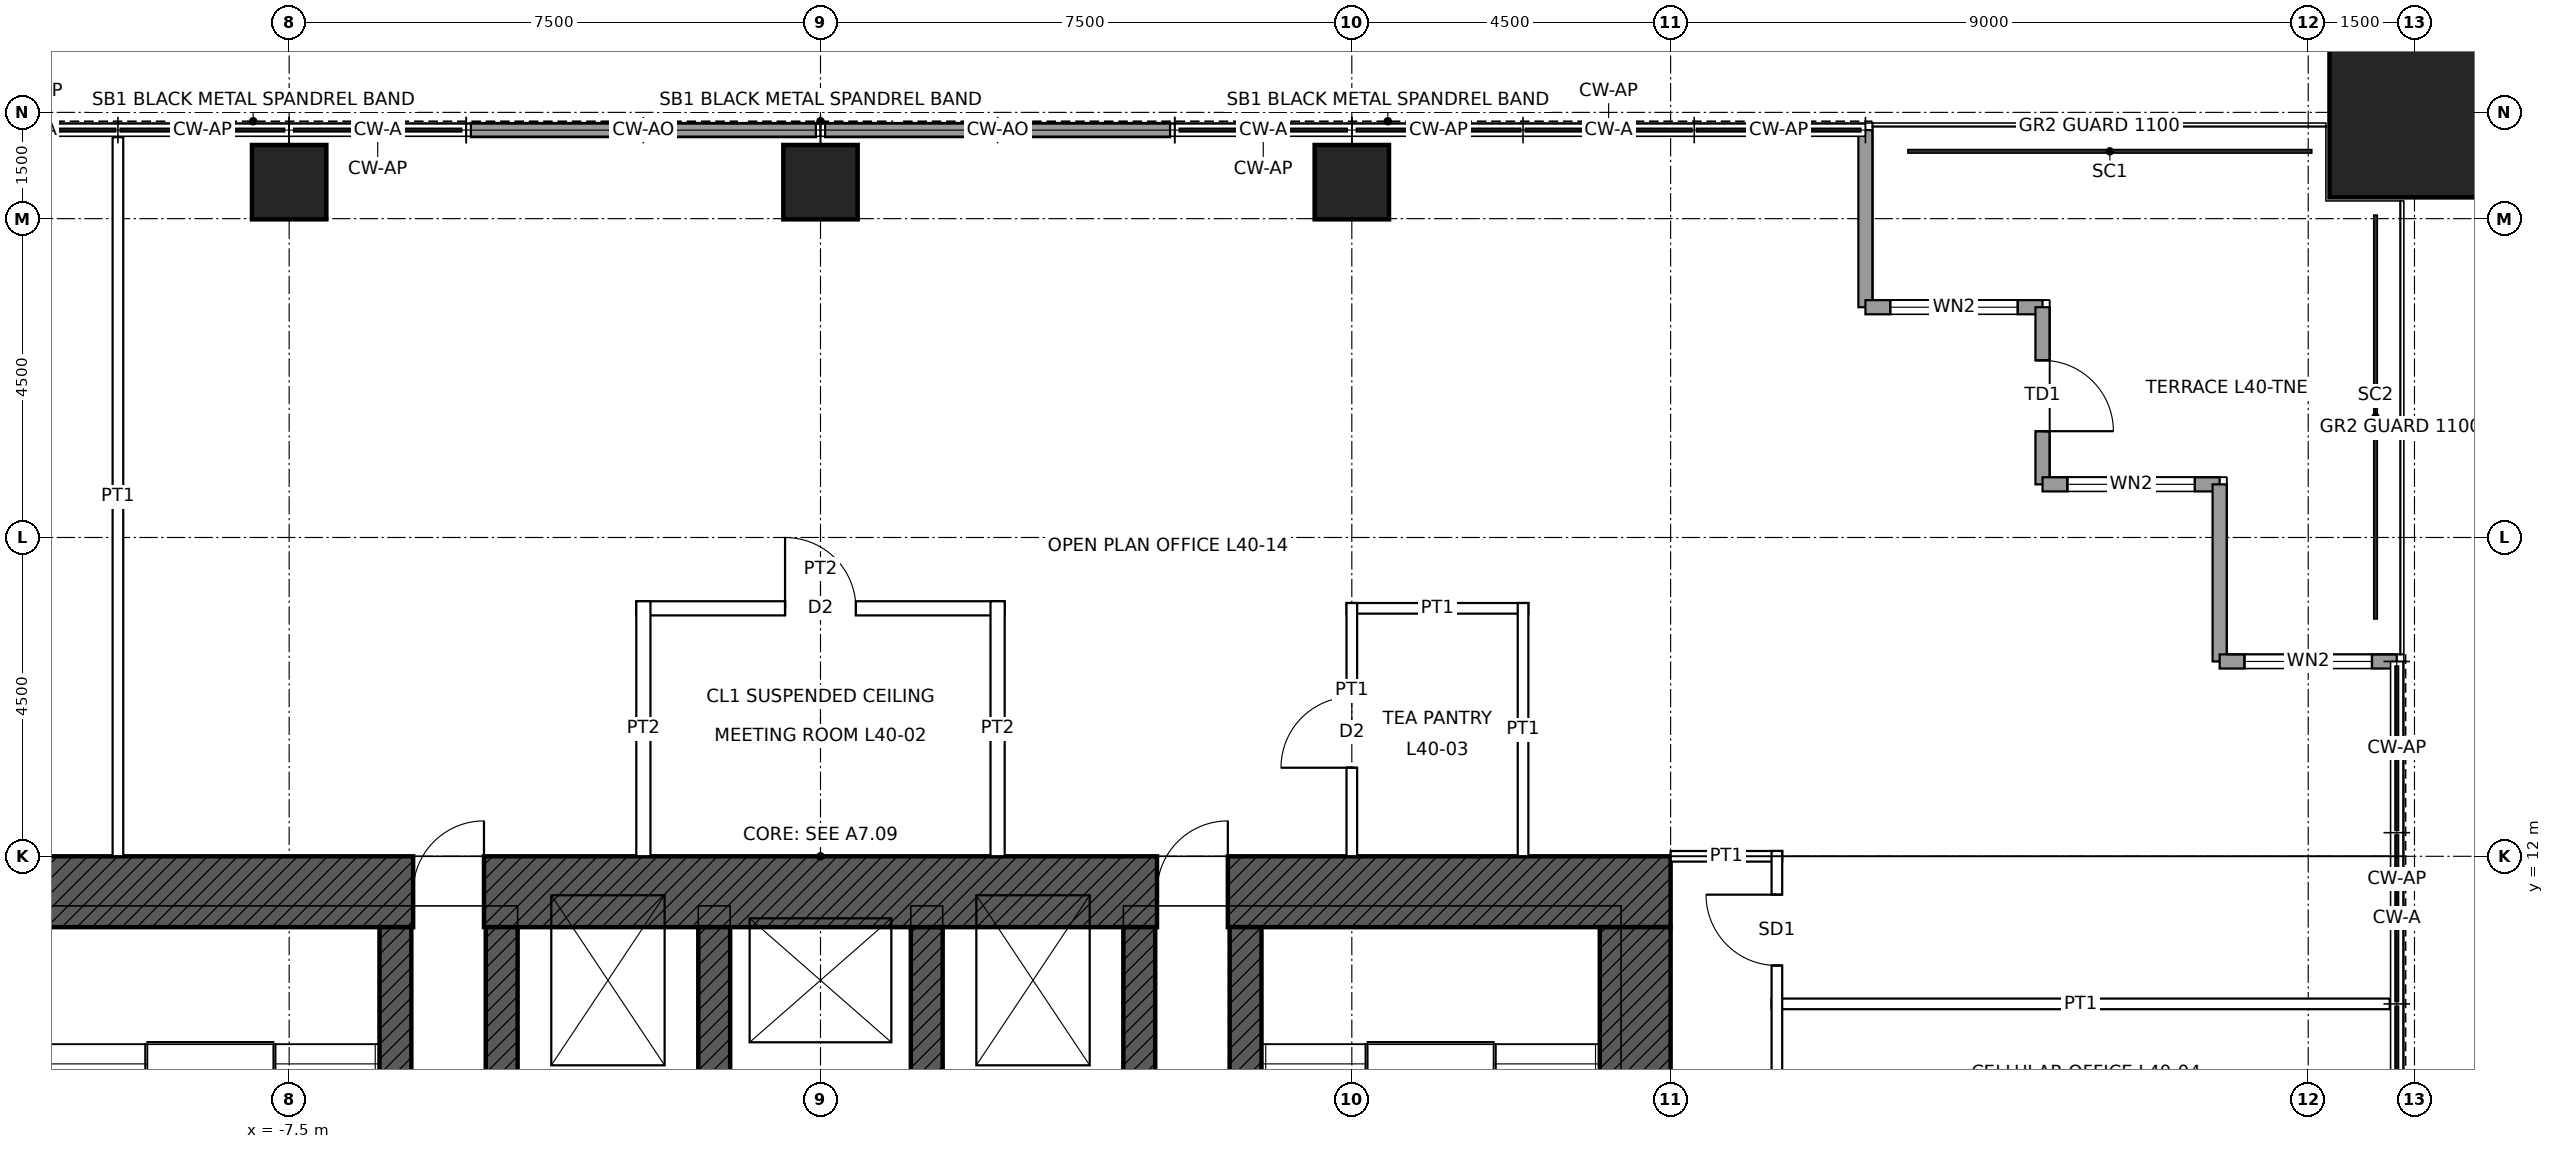
"""IFC4 building model, lengths in metres.
Left out: names, types, materials, properties, quantities, classifications, styles, units other than length and angle.
Written with IfcOpenShell. Run it as: python <this file> out.ifc"""

import sys

from ifc_helpers import new_model, si_unit, direction, frame, frame_2d, origin, origin_2d, place, context, subcontext, project, spatial, rectangle, hollow_rectangle, extrude, element, fill, save


model = new_model("IFC4")
c1 = context("Model", 3, precision=1e-05, world=origin(), true_north=direction((0.0, 1.0)))
c2 = subcontext(c1, "Body", "Model", "MODEL_VIEW")
j1 = project(units=[si_unit("LENGTHUNIT", "METRE"), si_unit("PLANEANGLEUNIT", "RADIAN")], contexts=[c1])
p1 = place(None, origin())
s1 = spatial("IfcSite", under=j1, at=p1, CompositionType="ELEMENT")
p2 = place(p1, origin())
s2 = spatial("IfcBuilding", under=s1, at=p2, CompositionType="ELEMENT")
p3 = place(p2, frame((0.0, 0.0, 193.9)))
s3 = spatial("IfcBuildingStorey", under=s2, at=p3, CompositionType="ELEMENT", Elevation=193.9)
p4 = place(p3, frame((22.5, 22.5, 0.0), z_axis=(0.0, 0.0, 1.0), x_axis=(1.0, 0.0, 0.0)))
e1 = element("IfcColumn", 1, at=p4, inside=s3, PredefinedType="COLUMN", context=c2, shape_type="SweptSolid", body=[
    extrude(hollow_rectangle(XDim=2.4, YDim=2.4, WallThickness=0.12, at=origin_2d()), origin(), (0.0, 0.0, 1.0), 4.0),
])
for number, where, z_axis, x_axis in (
    (2, (-7.5, 21.515, 0.0), (0.0, 0.0, 1.0), (1.0, 0.0, 0.0)),
    (3, (0.0, 21.515, 0.0), (0.0, 0.0, 1.0), (1.0, 0.0, 0.0)),
    (4, (7.5, 21.515, 0.0), (0.0, 0.0, 1.0), (1.0, 0.0, 0.0)),
):
    element("IfcColumn", number, at=place(p3, frame(where, z_axis=z_axis, x_axis=x_axis)), inside=s3, PredefinedType="COLUMN", context=c2, shape_type="SweptSolid", body=[
        extrude(hollow_rectangle(XDim=1.05, YDim=1.05, WallThickness=0.07, at=origin_2d()), origin(), (0.0, 0.0, 1.0), 4.0),
    ])
p5 = place(p3, frame((-12.0, 11.5, 0.0), z_axis=(0.0, 0.0, 1.0), x_axis=(1.0, 0.0, 0.0)))
e5 = element("IfcWall", 5, at=p5, inside=s3, PredefinedType="SHEAR", context=c2, shape_type="SweptSolid", body=[
    extrude(rectangle(XDim=24.0, YDim=1.0, at=frame_2d((12.0, 0.0))), origin(), (0.0, 0.0, 1.0), 4.0),
])
p6 = place(p5, frame((6.25, 0.0, 0.0)))
e6 = element("IfcOpeningElement", 6, at=p6, cuts=e5, PredefinedType="OPENING", context=c2, shape_type="SweptSolid", body=[
    extrude(rectangle(XDim=1.0, YDim=2.4, at=frame_2d((0.5, 1.2))), frame((0.0, 0.51, 0.0), z_axis=(0.0, -1.0, 0.0), x_axis=(1.0, 0.0, 0.0)), (0.0, 0.0, 1.0), 1.02),
])
p7 = place(p5, frame((16.75, 0.0, 0.0)))
e7 = element("IfcOpeningElement", 7, at=p7, cuts=e5, PredefinedType="OPENING", context=c2, shape_type="SweptSolid", body=[
    extrude(rectangle(XDim=1.0, YDim=2.4, at=frame_2d((0.5, 1.2))), frame((0.0, 0.51, 0.0), z_axis=(0.0, -1.0, 0.0), x_axis=(1.0, 0.0, 0.0)), (0.0, 0.0, 1.0), 1.02),
])
p8 = place(p3, frame((11.5, 11.0, 0.0), z_axis=(0.0, 0.0, 1.0), x_axis=(0.0, -1.0, 0.0)))
e8 = element("IfcWall", 8, at=p8, inside=s3, PredefinedType="SHEAR", context=c2, shape_type="SweptSolid", body=[
    extrude(rectangle(XDim=22.0, YDim=1.0, at=frame_2d((11.0, 0.0))), origin(), (0.0, 0.0, 1.0), 4.0),
])
p9 = place(p8, frame((10.5, 0.0, 0.0)))
e9 = element("IfcOpeningElement", 9, at=p9, cuts=e8, PredefinedType="OPENING", context=c2, shape_type="SweptSolid", body=[
    extrude(rectangle(XDim=1.0, YDim=2.4, at=frame_2d((0.5, 1.2))), frame((0.0, 0.51, 0.0), z_axis=(0.0, -1.0, 0.0), x_axis=(1.0, 0.0, 0.0)), (0.0, 0.0, 1.0), 1.02),
])
p10 = place(p3, frame((-6.0, 4.5, 0.0), z_axis=(0.0, 0.0, 1.0), x_axis=(0.0, 1.0, 0.0)))
e10 = element("IfcWall", 10, at=p10, inside=s3, PredefinedType="SHEAR", context=c2, shape_type="SweptSolid", body=[
    extrude(rectangle(XDim=6.5, YDim=0.45, at=frame_2d((3.25, 0.0))), origin(), (0.0, 0.0, 1.0), 4.0),
])
p11 = place(p10, frame((0.6, 0.0, 0.0)))
e11 = element("IfcOpeningElement", 11, at=p11, cuts=e10, PredefinedType="OPENING", context=c2, shape_type="SweptSolid", body=[
    extrude(rectangle(XDim=1.0, YDim=2.1, at=frame_2d((0.5, 1.05))), frame((0.0, 0.235, 0.0), z_axis=(0.0, -1.0, 0.0), x_axis=(1.0, 0.0, 0.0)), (0.0, 0.0, 1.0), 0.47),
])
p12 = place(p3, frame((6.0, 4.5, 0.0), z_axis=(0.0, 0.0, 1.0), x_axis=(0.0, 1.0, 0.0)))
e12 = element("IfcWall", 12, at=p12, inside=s3, PredefinedType="SHEAR", context=c2, shape_type="SweptSolid", body=[
    extrude(rectangle(XDim=6.5, YDim=0.45, at=frame_2d((3.25, 0.0))), origin(), (0.0, 0.0, 1.0), 4.0),
])
p13 = place(p12, frame((0.6, 0.0, 0.0)))
e13 = element("IfcOpeningElement", 13, at=p13, cuts=e12, PredefinedType="OPENING", context=c2, shape_type="SweptSolid", body=[
    extrude(rectangle(XDim=1.0, YDim=2.1, at=frame_2d((0.5, 1.05))), frame((0.0, 0.235, 0.0), z_axis=(0.0, -1.0, 0.0), x_axis=(1.0, 0.0, 0.0)), (0.0, 0.0, 1.0), 0.47),
])
for number, where, z_axis, x_axis in (
    (14, (-4.5, 8.5, 0.0), (0.0, 0.0, 1.0), (0.0, 1.0, 0.0)),
    (15, (4.5, 8.5, 0.0), (0.0, 0.0, 1.0), (0.0, 1.0, 0.0)),
    (16, (-1.5, 8.5, 0.0), (0.0, 0.0, 1.0), (0.0, 1.0, 0.0)),
    (17, (1.5, 8.5, 0.0), (0.0, 0.0, 1.0), (0.0, 1.0, 0.0)),
):
    element("IfcWall", number, at=place(p3, frame(where, z_axis=z_axis, x_axis=x_axis)), inside=s3, PredefinedType="SHEAR", context=c2, shape_type="SweptSolid", body=[
        extrude(rectangle(XDim=2.5, YDim=0.45, at=frame_2d((1.25, 0.0))), origin(), (0.0, 0.0, 1.0), 4.0),
    ])
p14 = place(p3, frame((14.75, 22.25, 0.0), z_axis=(0.0, 0.0, 1.0), x_axis=(0.0, -1.0, 0.0)))
e18 = element("IfcWall", 18, at=p14, inside=s3, PredefinedType="SOLIDWALL", context=c2, shape_type="SweptSolid", body=[
    extrude(rectangle(XDim=2.5, YDim=0.2, at=frame_2d((1.25, 0.0))), origin(), (0.0, 0.0, 1.0), 3.85),
])
p15 = place(p3, frame((14.75, 19.75, 0.0), z_axis=(0.0, 0.0, 1.0), x_axis=(1.0, 0.0, 0.0)))
e19 = element("IfcWall", 19, at=p15, inside=s3, PredefinedType="SOLIDWALL", context=c2, shape_type="SweptSolid", body=[
    extrude(rectangle(XDim=2.5, YDim=0.2, at=frame_2d((1.25, 0.0))), origin(), (0.0, 0.0, 1.0), 3.85),
])
p16 = place(p15, frame((0.35, 0.0, 0.3)))
e20 = element("IfcOpeningElement", 20, at=p16, cuts=e19, PredefinedType="OPENING", context=c2, shape_type="SweptSolid", body=[
    extrude(rectangle(XDim=1.8, YDim=2.4, at=frame_2d((0.9, 1.2))), frame((0.0, 0.11, 0.0), z_axis=(0.0, -1.0, 0.0), x_axis=(1.0, 0.0, 0.0)), (0.0, 0.0, 1.0), 0.22),
])
p17 = place(p3, frame((17.25, 19.75, 0.0), z_axis=(0.0, 0.0, 1.0), x_axis=(0.0, -1.0, 0.0)))
e21 = element("IfcWall", 21, at=p17, inside=s3, PredefinedType="SOLIDWALL", context=c2, shape_type="SweptSolid", body=[
    extrude(rectangle(XDim=2.5, YDim=0.2, at=frame_2d((1.25, 0.0))), origin(), (0.0, 0.0, 1.0), 3.85),
])
p18 = place(p17, frame((0.75, 0.0, 0.0)))
e22 = element("IfcOpeningElement", 22, at=p18, cuts=e21, PredefinedType="OPENING", context=c2, shape_type="SweptSolid", body=[
    extrude(rectangle(XDim=1.0, YDim=2.4, at=frame_2d((0.5, 1.2))), frame((0.0, 0.11, 0.0), z_axis=(0.0, -1.0, 0.0), x_axis=(1.0, 0.0, 0.0)), (0.0, 0.0, 1.0), 0.22),
])
p19 = place(p3, frame((17.25, 17.25, 0.0), z_axis=(0.0, 0.0, 1.0), x_axis=(1.0, 0.0, 0.0)))
e23 = element("IfcWall", 23, at=p19, inside=s3, PredefinedType="SOLIDWALL", context=c2, shape_type="SweptSolid", body=[
    extrude(rectangle(XDim=2.5, YDim=0.2, at=frame_2d((1.25, 0.0))), origin(), (0.0, 0.0, 1.0), 3.85),
])
p20 = place(p19, frame((0.35, 0.0, 0.3)))
e24 = element("IfcOpeningElement", 24, at=p20, cuts=e23, PredefinedType="OPENING", context=c2, shape_type="SweptSolid", body=[
    extrude(rectangle(XDim=1.8, YDim=2.4, at=frame_2d((0.9, 1.2))), frame((0.0, 0.11, 0.0), z_axis=(0.0, -1.0, 0.0), x_axis=(1.0, 0.0, 0.0)), (0.0, 0.0, 1.0), 0.22),
])
p21 = place(p3, frame((19.75, 17.25, 0.0), z_axis=(0.0, 0.0, 1.0), x_axis=(0.0, -1.0, 0.0)))
e25 = element("IfcWall", 25, at=p21, inside=s3, PredefinedType="SOLIDWALL", context=c2, shape_type="SweptSolid", body=[
    extrude(rectangle(XDim=2.5, YDim=0.2, at=frame_2d((1.25, 0.0))), origin(), (0.0, 0.0, 1.0), 3.85),
])
p22 = place(p3, frame((19.75, 14.75, 0.0), z_axis=(0.0, 0.0, 1.0), x_axis=(1.0, 0.0, 0.0)))
e26 = element("IfcWall", 26, at=p22, inside=s3, PredefinedType="SOLIDWALL", context=c2, shape_type="SweptSolid", body=[
    extrude(rectangle(XDim=2.5, YDim=0.2, at=frame_2d((1.25, 0.0))), origin(), (0.0, 0.0, 1.0), 3.85),
])
p23 = place(p22, frame((0.35, 0.0, 0.3)))
e27 = element("IfcOpeningElement", 27, at=p23, cuts=e26, PredefinedType="OPENING", context=c2, shape_type="SweptSolid", body=[
    extrude(rectangle(XDim=1.8, YDim=2.4, at=frame_2d((0.9, 1.2))), frame((0.0, 0.11, 0.0), z_axis=(0.0, -1.0, 0.0), x_axis=(1.0, 0.0, 0.0)), (0.0, 0.0, 1.0), 0.22),
])
for number, where, z_axis, x_axis in (
    (28, (-4.935, 22.25, 0.0), (0.0, 0.0, 1.0), (1.0, 0.0, 0.0)),
    (29, (-2.468, 22.25, 0.0), (0.0, 0.0, 1.0), (1.0, 0.0, 0.0)),
    (30, (0.065, 22.25, 0.0), (0.0, 0.0, 1.0), (1.0, 0.0, 0.0)),
    (31, (2.532, 22.25, 0.0), (0.0, 0.0, 1.0), (1.0, 0.0, 0.0)),
):
    element("IfcWall", number, at=place(p3, frame(where, z_axis=z_axis, x_axis=x_axis)), inside=s3, PredefinedType="SOLIDWALL", context=c2, shape_type="SweptSolid", body=[
        extrude(rectangle(XDim=2.403, YDim=0.2, at=frame_2d((1.201, 0.0))), origin(), (0.0, 0.0, 1.0), 3.85),
    ])
p24 = place(p3, frame((13.425, 9.917, 0.0), z_axis=(0.0, 0.0, 1.0), x_axis=(1.0, 0.0, 0.0)))
e32 = element("IfcWall", 32, at=p24, inside=s3, PredefinedType="PARTITIONING", context=c2, shape_type="SweptSolid", body=[
    extrude(rectangle(XDim=8.725, YDim=0.15, at=frame_2d((4.362, 0.0))), origin(), (0.0, 0.0, 1.0), 3.85),
])
p25 = place(p3, frame((12.0, 12.0, 0.0), z_axis=(0.0, 0.0, 1.0), x_axis=(1.0, 0.0, 0.0)))
e33 = element("IfcWall", 33, at=p25, inside=s3, PredefinedType="PARTITIONING", context=c2, shape_type="SweptSolid", body=[
    extrude(rectangle(XDim=1.575, YDim=0.15, at=frame_2d((0.788, 0.0))), origin(), (0.0, 0.0, 1.0), 2.908),
])
p26 = place(p3, frame((-2.6, 15.5, 0.0), z_axis=(0.0, 0.0, 1.0), x_axis=(1.0, 0.0, 0.0)))
e34 = element("IfcWall", 34, at=p26, inside=s3, PredefinedType="PARTITIONING", context=c2, shape_type="SweptSolid", body=[
    extrude(rectangle(XDim=5.2, YDim=0.2, at=frame_2d((2.6, 0.0))), origin(), (0.0, 0.0, 1.0), 3.85),
])
p27 = place(p26, frame((2.1, 0.0, 0.0)))
e35 = element("IfcOpeningElement", 35, at=p27, cuts=e34, PredefinedType="OPENING", context=c2, shape_type="SweptSolid", body=[
    extrude(rectangle(XDim=1.0, YDim=2.1, at=frame_2d((0.5, 1.05))), frame((0.0, 0.11, 0.0), z_axis=(0.0, -1.0, 0.0), x_axis=(1.0, 0.0, 0.0)), (0.0, 0.0, 1.0), 0.22),
])
p28 = place(p3, frame((7.425, 15.5, 0.0), z_axis=(0.0, 0.0, 1.0), x_axis=(1.0, 0.0, 0.0)))
e36 = element("IfcWall", 36, at=p28, inside=s3, PredefinedType="PARTITIONING", context=c2, shape_type="SweptSolid", body=[
    extrude(rectangle(XDim=2.567, YDim=0.15, at=frame_2d((1.283, 0.0))), origin(), (0.0, 0.0, 1.0), 3.85),
])
p29 = place(p3, frame((-9.917, 12.0, 0.0), z_axis=(0.0, 0.0, 1.0), x_axis=(0.0, 1.0, 0.0)))
e37 = element("IfcWall", 37, at=p29, inside=s3, PredefinedType="PARTITIONING", context=c2, shape_type="SweptSolid", body=[
    extrude(rectangle(XDim=10.15, YDim=0.15, at=frame_2d((5.075, 0.0))), origin(), (0.0, 0.0, 1.0), 3.85),
])
for number, where, z_axis, x_axis in (
    (38, (-2.5, 12.0, 0.0), (0.0, 0.0, 1.0), (0.0, 1.0, 0.0)),
    (39, (2.5, 12.0, 0.0), (0.0, 0.0, 1.0), (0.0, 1.0, 0.0)),
):
    element("IfcWall", number, at=place(p3, frame(where, z_axis=z_axis, x_axis=x_axis)), inside=s3, PredefinedType="PARTITIONING", context=c2, shape_type="SweptSolid", body=[
        extrude(rectangle(XDim=3.6, YDim=0.2, at=frame_2d((1.8, 0.0))), origin(), (0.0, 0.0, 1.0), 3.85),
    ])
p30 = place(p3, frame((7.5, 12.0, 0.0), z_axis=(0.0, 0.0, 1.0), x_axis=(0.0, 1.0, 0.0)))
e40 = element("IfcWall", 40, at=p30, inside=s3, PredefinedType="PARTITIONING", context=c2, shape_type="SweptSolid", body=[
    extrude(rectangle(XDim=3.575, YDim=0.15, at=frame_2d((1.788, 0.0))), origin(), (0.0, 0.0, 1.0), 3.238),
])
p31 = place(p30, frame((1.25, 0.0, 0.0)))
e41 = element("IfcOpeningElement", 41, at=p31, cuts=e40, PredefinedType="OPENING", context=c2, shape_type="SweptSolid", body=[
    extrude(rectangle(XDim=1.0, YDim=2.1, at=frame_2d((0.5, 1.05))), frame((0.0, 0.085, 0.0), z_axis=(0.0, -1.0, 0.0), x_axis=(1.0, 0.0, 0.0)), (0.0, 0.0, 1.0), 0.17),
])
p32 = place(p3, frame((9.917, 12.0, 0.0), z_axis=(0.0, 0.0, 1.0), x_axis=(0.0, 1.0, 0.0)))
e42 = element("IfcWall", 42, at=p32, inside=s3, PredefinedType="PARTITIONING", context=c2, shape_type="SweptSolid", body=[
    extrude(rectangle(XDim=3.575, YDim=0.15, at=frame_2d((1.788, 0.0))), origin(), (0.0, 0.0, 1.0), 3.85),
])
p33 = place(p3, frame((13.5, -5.075, 0.0), z_axis=(0.0, 0.0, 1.0), x_axis=(0.0, 1.0, 0.0)))
e43 = element("IfcWall", 43, at=p33, inside=s3, PredefinedType="PARTITIONING", context=c2, shape_type="SweptSolid", body=[
    extrude(rectangle(XDim=17.15, YDim=0.15, at=frame_2d((8.575, 0.0))), origin(), (0.0, 0.0, 1.0), 3.85),
])
p34 = place(p33, frame((2.975, 0.0, 0.0)))
e44 = element("IfcOpeningElement", 44, at=p34, cuts=e43, PredefinedType="OPENING", context=c2, shape_type="SweptSolid", body=[
    extrude(rectangle(XDim=1.0, YDim=2.4, at=frame_2d((0.5, 1.2))), frame((0.0, 0.085, 0.0), z_axis=(0.0, -1.0, 0.0), x_axis=(1.0, 0.0, 0.0)), (0.0, 0.0, 1.0), 0.17),
])
p35 = place(p33, frame((15.533, 0.0, 0.0)))
e45 = element("IfcOpeningElement", 45, at=p35, cuts=e43, PredefinedType="OPENING", context=c2, shape_type="SweptSolid", body=[
    extrude(rectangle(XDim=1.0, YDim=2.4, at=frame_2d((0.5, 1.2))), frame((0.0, 0.085, 0.0), z_axis=(0.0, -1.0, 0.0), x_axis=(1.0, 0.0, 0.0)), (0.0, 0.0, 1.0), 0.17),
])
p36 = place(p16, origin())
e46 = element("IfcWindow", 46, at=p36, inside=s3, PartitioningType="SINGLE_PANEL", PredefinedType="WINDOW", context=c2, shape_type="SweptSolid", body=[
    extrude(rectangle(XDim=1.8, YDim=2.4, at=frame_2d((0.9, 1.2))), frame((0.0, 0.03, 0.0), z_axis=(0.0, -1.0, 0.0), x_axis=(1.0, 0.0, 0.0)), (0.0, 0.0, 1.0), 0.06),
])
fill(e20, e46)
p37 = place(p18, origin())
e47 = element("IfcDoor", 47, at=p37, inside=s3, OperationType="SINGLE_SWING_RIGHT", PredefinedType="DOOR", context=c2, shape_type="SweptSolid", body=[
    extrude(rectangle(XDim=1.0, YDim=2.4, at=frame_2d((0.5, 1.2))), frame((0.0, 0.025, 0.0), z_axis=(0.0, -1.0, 0.0), x_axis=(1.0, 0.0, 0.0)), (0.0, 0.0, 1.0), 0.05),
])
fill(e22, e47)
p38 = place(p20, origin())
e48 = element("IfcWindow", 48, at=p38, inside=s3, PartitioningType="SINGLE_PANEL", PredefinedType="WINDOW", context=c2, shape_type="SweptSolid", body=[
    extrude(rectangle(XDim=1.8, YDim=2.4, at=frame_2d((0.9, 1.2))), frame((0.0, 0.03, 0.0), z_axis=(0.0, -1.0, 0.0), x_axis=(1.0, 0.0, 0.0)), (0.0, 0.0, 1.0), 0.06),
])
fill(e24, e48)
p39 = place(p23, origin())
e49 = element("IfcWindow", 49, at=p39, inside=s3, PartitioningType="SINGLE_PANEL", PredefinedType="WINDOW", context=c2, shape_type="SweptSolid", body=[
    extrude(rectangle(XDim=1.8, YDim=2.4, at=frame_2d((0.9, 1.2))), frame((0.0, 0.03, 0.0), z_axis=(0.0, -1.0, 0.0), x_axis=(1.0, 0.0, 0.0)), (0.0, 0.0, 1.0), 0.06),
])
fill(e27, e49)
p40 = place(p6, origin())
e50 = element("IfcDoor", 50, at=p40, inside=s3, OperationType="SINGLE_SWING_RIGHT", PredefinedType="DOOR", context=c2, shape_type="SweptSolid", body=[
    extrude(rectangle(XDim=1.0, YDim=2.4, at=frame_2d((0.5, 1.2))), frame((0.0, 0.485, 0.0), z_axis=(0.0, -1.0, 0.0), x_axis=(1.0, 0.0, 0.0)), (0.0, 0.0, 1.0), 0.05),
])
fill(e6, e50)
p41 = place(p7, origin())
e51 = element("IfcDoor", 51, at=p41, inside=s3, OperationType="SINGLE_SWING_RIGHT", PredefinedType="DOOR", context=c2, shape_type="SweptSolid", body=[
    extrude(rectangle(XDim=1.0, YDim=2.4, at=frame_2d((0.5, 1.2))), frame((0.0, 0.485, 0.0), z_axis=(0.0, -1.0, 0.0), x_axis=(1.0, 0.0, 0.0)), (0.0, 0.0, 1.0), 0.05),
])
fill(e7, e51)
p42 = place(p27, origin())
e52 = element("IfcDoor", 52, at=p42, inside=s3, OperationType="SINGLE_SWING_LEFT", PredefinedType="DOOR", context=c2, shape_type="SweptSolid", body=[
    extrude(rectangle(XDim=1.0, YDim=2.1, at=frame_2d((0.5, 1.05))), frame((0.0, 0.025, 0.0), z_axis=(0.0, -1.0, 0.0), x_axis=(1.0, 0.0, 0.0)), (0.0, 0.0, 1.0), 0.05),
])
fill(e35, e52)
p43 = place(p31, origin())
e53 = element("IfcDoor", 53, at=p43, inside=s3, OperationType="SINGLE_SWING_LEFT", PredefinedType="DOOR", context=c2, shape_type="SweptSolid", body=[
    extrude(rectangle(XDim=1.0, YDim=2.1, at=frame_2d((0.5, 1.05))), frame((0.0, 0.025, 0.0), z_axis=(0.0, -1.0, 0.0), x_axis=(1.0, 0.0, 0.0)), (0.0, 0.0, 1.0), 0.05),
])
fill(e41, e53)
p44 = place(p35, origin())
e54 = element("IfcDoor", 54, at=p44, inside=s3, OperationType="SINGLE_SWING_RIGHT", PredefinedType="DOOR", context=c2, shape_type="SweptSolid", body=[
    extrude(rectangle(XDim=1.0, YDim=2.4, at=frame_2d((0.5, 1.2))), frame((0.0, 0.025, 0.0), z_axis=(0.0, -1.0, 0.0), x_axis=(1.0, 0.0, 0.0)), (0.0, 0.0, 1.0), 0.05),
])
fill(e45, e54)
save(model, sys.argv[1])
